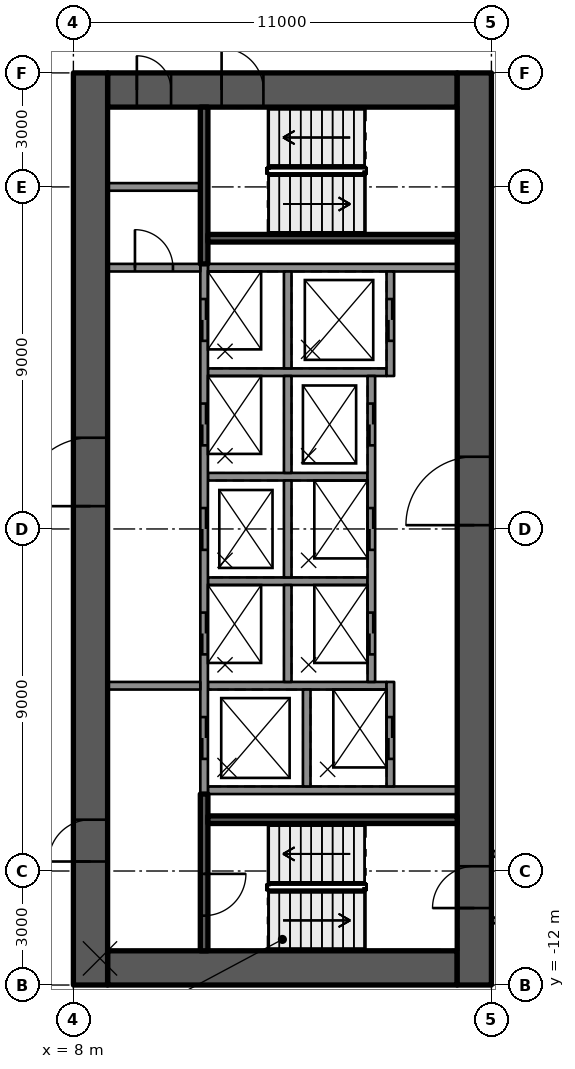
"""IFC4 building model, lengths in metres.
Left out: names, types, materials, properties, quantities, classifications, styles, units other than length and angle.
Written with IfcOpenShell. Run it as: python <this file> out.ifc"""

import sys

from ifc_helpers import new_model, si_unit, direction, frame, frame_2d, origin, place, context, subcontext, project, spatial, rectangle, extrude, element, fill, save


model = new_model("IFC4")
c1 = context("Model", 3, precision=1e-05, world=origin(), true_north=direction((0.0, 1.0)))
c2 = subcontext(c1, "Body", "Model", "MODEL_VIEW")
j1 = project(units=[si_unit("LENGTHUNIT", "METRE"), si_unit("PLANEANGLEUNIT", "RADIAN")], contexts=[c1])
p1 = place(None, origin())
s1 = spatial("IfcSite", under=j1, at=p1, CompositionType="ELEMENT")
p2 = place(p1, origin())
s2 = spatial("IfcBuilding", under=s1, at=p2, CompositionType="ELEMENT")
p3 = place(p2, origin())
s3 = spatial("IfcBuildingStorey", under=s2, at=p3, CompositionType="ELEMENT", Elevation=0.0)
p4 = place(p3, frame((8.9, 11.55, -0.5), z_axis=(0.0, 0.0, 1.0), x_axis=(1.0, 0.0, 0.0)))
e1 = element("IfcWall", 1, at=p4, inside=s3, PredefinedType="SHEAR", context=c2, shape_type="SweptSolid", body=[
    extrude(rectangle(XDim=9.2, YDim=0.9, at=frame_2d((4.6, 0.0))), origin(), (0.0, 0.0, 1.0), 11.0),
])
p5 = place(p4, frame((3.0, 0.0, 0.5)))
e2 = element("IfcOpeningElement", 2, at=p5, cuts=e1, PredefinedType="OPENING", context=c2, shape_type="SweptSolid", body=[
    extrude(rectangle(XDim=1.1, YDim=2.1, at=frame_2d((0.55, 1.05))), frame((0.0, 0.46, 0.0), z_axis=(0.0, -1.0, 0.0), x_axis=(1.0, 0.0, 0.0)), (0.0, 0.0, 1.0), 0.92),
])
p6 = place(p4, frame((0.77, 0.0, 0.5)))
e3 = element("IfcOpeningElement", 3, at=p6, cuts=e1, PredefinedType="OPENING", context=c2, shape_type="SweptSolid", body=[
    extrude(rectangle(XDim=0.9, YDim=2.1, at=frame_2d((0.45, 1.05))), frame((0.0, 0.46, 0.0), z_axis=(0.0, -1.0, 0.0), x_axis=(1.0, 0.0, 0.0)), (0.0, 0.0, 1.0), 0.92),
])
p7 = place(p3, frame((8.9, -11.55, -0.5), z_axis=(0.0, 0.0, 1.0), x_axis=(1.0, 0.0, 0.0)))
e4 = element("IfcWall", 4, at=p7, inside=s3, PredefinedType="SHEAR", context=c2, shape_type="SweptSolid", body=[
    extrude(rectangle(XDim=9.2, YDim=0.9, at=frame_2d((4.6, 0.0))), origin(), (0.0, 0.0, 1.0), 11.0),
])
p8 = place(p3, frame((8.45, -12.0, -0.5), z_axis=(0.0, 0.0, 1.0), x_axis=(0.0, 1.0, 0.0)))
e5 = element("IfcWall", 5, at=p8, inside=s3, PredefinedType="SHEAR", context=c2, shape_type="SweptSolid", body=[
    extrude(rectangle(XDim=24.0, YDim=0.9, at=frame_2d((12.0, 0.0))), origin(), (0.0, 0.0, 1.0), 11.0),
])
p9 = place(p8, frame((12.6, 0.0, 0.5)))
e6 = element("IfcOpeningElement", 6, at=p9, cuts=e5, PredefinedType="OPENING", context=c2, shape_type="SweptSolid", body=[
    extrude(rectangle(XDim=1.8, YDim=2.1, at=frame_2d((0.9, 1.05))), frame((0.0, 0.46, 0.0), z_axis=(0.0, -1.0, 0.0), x_axis=(1.0, 0.0, 0.0)), (0.0, 0.0, 1.0), 0.92),
])
p10 = place(p8, frame((3.25, 0.0, 0.5)))
e7 = element("IfcOpeningElement", 7, at=p10, cuts=e5, PredefinedType="OPENING", context=c2, shape_type="SweptSolid", body=[
    extrude(rectangle(XDim=1.1, YDim=2.1, at=frame_2d((0.55, 1.05))), frame((0.0, 0.46, 0.0), z_axis=(0.0, -1.0, 0.0), x_axis=(1.0, 0.0, 0.0)), (0.0, 0.0, 1.0), 0.92),
])
p11 = place(p3, frame((18.55, -12.0, -0.5), z_axis=(0.0, 0.0, 1.0), x_axis=(0.0, 1.0, 0.0)))
e8 = element("IfcWall", 8, at=p11, inside=s3, PredefinedType="SHEAR", context=c2, shape_type="SweptSolid", body=[
    extrude(rectangle(XDim=24.0, YDim=0.9, at=frame_2d((12.0, 0.0))), origin(), (0.0, 0.0, 1.0), 11.0),
])
p12 = place(p11, frame((12.1, 0.0, 0.5)))
e9 = element("IfcOpeningElement", 9, at=p12, cuts=e8, PredefinedType="OPENING", context=c2, shape_type="SweptSolid", body=[
    extrude(rectangle(XDim=1.8, YDim=2.1, at=frame_2d((0.9, 1.05))), frame((0.0, 0.46, 0.0), z_axis=(0.0, -1.0, 0.0), x_axis=(1.0, 0.0, 0.0)), (0.0, 0.0, 1.0), 0.92),
])
p13 = place(p11, frame((2.025, 0.0, 0.5)))
e10 = element("IfcOpeningElement", 10, at=p13, cuts=e8, PredefinedType="OPENING", context=c2, shape_type="SweptSolid", body=[
    extrude(rectangle(XDim=1.1, YDim=2.1, at=frame_2d((0.55, 1.05))), frame((0.0, 0.46, 0.0), z_axis=(0.0, -1.0, 0.0), x_axis=(1.0, 0.0, 0.0)), (0.0, 0.0, 1.0), 0.92),
])
for number, where, z_axis, x_axis in (
    (11, (11.54, -6.875, 0.0), (0.0, 0.0, 1.0), (1.0, 0.0, 0.0)),
    (12, (11.54, 6.875, 0.0), (0.0, 0.0, 1.0), (1.0, 0.0, 0.0)),
):
    element("IfcWall", number, at=place(p3, frame(where, z_axis=z_axis, x_axis=x_axis)), inside=s3, PredefinedType="SOLIDWALL", context=c2, shape_type="SweptSolid", body=[
        extrude(rectangle(XDim=6.56, YDim=0.2, at=frame_2d((3.28, 0.0))), origin(), (0.0, 0.0, 1.0), 10.09),
    ])
p14 = place(p3, frame((11.54, 4.125, 0.0), z_axis=(0.0, 0.0, 1.0), x_axis=(1.0, 0.0, 0.0)))
e13 = element("IfcWall", 13, at=p14, inside=s3, PredefinedType="SOLIDWALL", context=c2, shape_type="SweptSolid", body=[
    extrude(rectangle(XDim=4.7, YDim=0.2, at=frame_2d((2.35, 0.0))), origin(), (0.0, 0.0, 1.0), 10.09),
])
for number, where, z_axis, x_axis in (
    (14, (11.54, 1.375, 0.0), (0.0, 0.0, 1.0), (1.0, 0.0, 0.0)),
    (15, (11.54, -1.375, 0.0), (0.0, 0.0, 1.0), (1.0, 0.0, 0.0)),
):
    element("IfcWall", number, at=place(p3, frame(where, z_axis=z_axis, x_axis=x_axis)), inside=s3, PredefinedType="SOLIDWALL", context=c2, shape_type="SweptSolid", body=[
        extrude(rectangle(XDim=4.2, YDim=0.2, at=frame_2d((2.1, 0.0))), origin(), (0.0, 0.0, 1.0), 10.09),
    ])
p15 = place(p3, frame((11.54, -4.125, 0.0), z_axis=(0.0, 0.0, 1.0), x_axis=(1.0, 0.0, 0.0)))
e16 = element("IfcWall", 16, at=p15, inside=s3, PredefinedType="SOLIDWALL", context=c2, shape_type="SweptSolid", body=[
    extrude(rectangle(XDim=4.7, YDim=0.2, at=frame_2d((2.35, 0.0))), origin(), (0.0, 0.0, 1.0), 10.09),
])
p16 = place(p3, frame((11.44, 6.975, 0.0), z_axis=(0.0, 0.0, 1.0), x_axis=(0.0, -1.0, 0.0)))
e17 = element("IfcWall", 17, at=p16, inside=s3, PredefinedType="SOLIDWALL", context=c2, shape_type="SweptSolid", body=[
    extrude(rectangle(XDim=13.95, YDim=0.2, at=frame_2d((6.975, 0.0))), origin(), (0.0, 0.0, 1.0), 10.09),
])
p17 = place(p16, frame((0.925, 0.0, 0.0)))
e18 = element("IfcOpeningElement", 18, at=p17, cuts=e17, PredefinedType="OPENING", context=c2, shape_type="SweptSolid", body=[
    extrude(rectangle(XDim=1.1, YDim=2.1, at=frame_2d((0.55, 1.05))), frame((0.0, 0.11, 0.0), z_axis=(0.0, -1.0, 0.0), x_axis=(1.0, 0.0, 0.0)), (0.0, 0.0, 1.0), 0.22),
])
p18 = place(p16, frame((3.675, 0.0, 0.0)))
e19 = element("IfcOpeningElement", 19, at=p18, cuts=e17, PredefinedType="OPENING", context=c2, shape_type="SweptSolid", body=[
    extrude(rectangle(XDim=1.1, YDim=2.1, at=frame_2d((0.55, 1.05))), frame((0.0, 0.11, 0.0), z_axis=(0.0, -1.0, 0.0), x_axis=(1.0, 0.0, 0.0)), (0.0, 0.0, 1.0), 0.22),
])
p19 = place(p16, frame((6.425, 0.0, 0.0)))
e20 = element("IfcOpeningElement", 20, at=p19, cuts=e17, PredefinedType="OPENING", context=c2, shape_type="SweptSolid", body=[
    extrude(rectangle(XDim=1.1, YDim=2.1, at=frame_2d((0.55, 1.05))), frame((0.0, 0.11, 0.0), z_axis=(0.0, -1.0, 0.0), x_axis=(1.0, 0.0, 0.0)), (0.0, 0.0, 1.0), 0.22),
])
p20 = place(p16, frame((9.175, 0.0, 0.0)))
e21 = element("IfcOpeningElement", 21, at=p20, cuts=e17, PredefinedType="OPENING", context=c2, shape_type="SweptSolid", body=[
    extrude(rectangle(XDim=1.1, YDim=2.1, at=frame_2d((0.55, 1.05))), frame((0.0, 0.11, 0.0), z_axis=(0.0, -1.0, 0.0), x_axis=(1.0, 0.0, 0.0)), (0.0, 0.0, 1.0), 0.22),
])
p21 = place(p16, frame((11.925, 0.0, 0.0)))
e22 = element("IfcOpeningElement", 22, at=p21, cuts=e17, PredefinedType="OPENING", context=c2, shape_type="SweptSolid", body=[
    extrude(rectangle(XDim=1.1, YDim=2.1, at=frame_2d((0.55, 1.05))), frame((0.0, 0.11, 0.0), z_axis=(0.0, -1.0, 0.0), x_axis=(1.0, 0.0, 0.0)), (0.0, 0.0, 1.0), 0.22),
])
for number, where, z_axis, x_axis in (
    (23, (13.64, 6.775, 0.0), (0.0, 0.0, 1.0), (0.0, -1.0, 0.0)),
    (24, (13.64, 4.025, 0.0), (0.0, 0.0, 1.0), (0.0, -1.0, 0.0)),
    (25, (13.64, 1.275, 0.0), (0.0, 0.0, 1.0), (0.0, -1.0, 0.0)),
    (26, (13.64, -1.475, 0.0), (0.0, 0.0, 1.0), (0.0, -1.0, 0.0)),
    (27, (14.14, -4.225, 0.0), (0.0, 0.0, 1.0), (0.0, -1.0, 0.0)),
):
    element("IfcWall", number, at=place(p3, frame(where, z_axis=z_axis, x_axis=x_axis)), inside=s3, PredefinedType="SOLIDWALL", context=c2, shape_type="SweptSolid", body=[
        extrude(rectangle(XDim=2.55, YDim=0.2, at=frame_2d((1.275, 0.0))), origin(), (0.0, 0.0, 1.0), 10.09),
    ])
p22 = place(p3, frame((16.34, 6.775, 0.0), z_axis=(0.0, 0.0, 1.0), x_axis=(0.0, -1.0, 0.0)))
e28 = element("IfcWall", 28, at=p22, inside=s3, PredefinedType="SOLIDWALL", context=c2, shape_type="SweptSolid", body=[
    extrude(rectangle(XDim=2.75, YDim=0.2, at=frame_2d((1.375, 0.0))), origin(), (0.0, 0.0, 1.0), 10.09),
])
p23 = place(p22, frame((0.725, 0.0, 0.0)))
e29 = element("IfcOpeningElement", 29, at=p23, cuts=e28, PredefinedType="OPENING", context=c2, shape_type="SweptSolid", body=[
    extrude(rectangle(XDim=1.1, YDim=2.1, at=frame_2d((0.55, 1.05))), frame((0.0, 0.11, 0.0), z_axis=(0.0, -1.0, 0.0), x_axis=(1.0, 0.0, 0.0)), (0.0, 0.0, 1.0), 0.22),
])
p24 = place(p3, frame((15.84, 4.025, 0.0), z_axis=(0.0, 0.0, 1.0), x_axis=(0.0, -1.0, 0.0)))
e30 = element("IfcWall", 30, at=p24, inside=s3, PredefinedType="SOLIDWALL", context=c2, shape_type="SweptSolid", body=[
    extrude(rectangle(XDim=8.05, YDim=0.2, at=frame_2d((4.025, 0.0))), origin(), (0.0, 0.0, 1.0), 10.09),
])
p25 = place(p24, frame((0.725, 0.0, 0.0)))
e31 = element("IfcOpeningElement", 31, at=p25, cuts=e30, PredefinedType="OPENING", context=c2, shape_type="SweptSolid", body=[
    extrude(rectangle(XDim=1.1, YDim=2.1, at=frame_2d((0.55, 1.05))), frame((0.0, 0.11, 0.0), z_axis=(0.0, -1.0, 0.0), x_axis=(1.0, 0.0, 0.0)), (0.0, 0.0, 1.0), 0.22),
])
p26 = place(p24, frame((3.475, 0.0, 0.0)))
e32 = element("IfcOpeningElement", 32, at=p26, cuts=e30, PredefinedType="OPENING", context=c2, shape_type="SweptSolid", body=[
    extrude(rectangle(XDim=1.1, YDim=2.1, at=frame_2d((0.55, 1.05))), frame((0.0, 0.11, 0.0), z_axis=(0.0, -1.0, 0.0), x_axis=(1.0, 0.0, 0.0)), (0.0, 0.0, 1.0), 0.22),
])
p27 = place(p24, frame((6.225, 0.0, 0.0)))
e33 = element("IfcOpeningElement", 33, at=p27, cuts=e30, PredefinedType="OPENING", context=c2, shape_type="SweptSolid", body=[
    extrude(rectangle(XDim=1.1, YDim=2.1, at=frame_2d((0.55, 1.05))), frame((0.0, 0.11, 0.0), z_axis=(0.0, -1.0, 0.0), x_axis=(1.0, 0.0, 0.0)), (0.0, 0.0, 1.0), 0.22),
])
p28 = place(p3, frame((16.34, -4.025, 0.0), z_axis=(0.0, 0.0, 1.0), x_axis=(0.0, -1.0, 0.0)))
e34 = element("IfcWall", 34, at=p28, inside=s3, PredefinedType="SOLIDWALL", context=c2, shape_type="SweptSolid", body=[
    extrude(rectangle(XDim=2.75, YDim=0.2, at=frame_2d((1.375, 0.0))), origin(), (0.0, 0.0, 1.0), 10.09),
])
p29 = place(p28, frame((0.925, 0.0, 0.0)))
e35 = element("IfcOpeningElement", 35, at=p29, cuts=e34, PredefinedType="OPENING", context=c2, shape_type="SweptSolid", body=[
    extrude(rectangle(XDim=1.1, YDim=2.1, at=frame_2d((0.55, 1.05))), frame((0.0, 0.11, 0.0), z_axis=(0.0, -1.0, 0.0), x_axis=(1.0, 0.0, 0.0)), (0.0, 0.0, 1.0), 0.22),
])
p30 = place(p3, frame((11.44, -6.975, 0.0), z_axis=(0.0, 0.0, 1.0), x_axis=(0.0, -1.0, 0.0)))
e36 = element("IfcWall", 36, at=p30, inside=s3, PredefinedType="SOLIDWALL", context=c2, shape_type="SweptSolid", body=[
    extrude(rectangle(XDim=4.125, YDim=0.2, at=frame_2d((2.062, 0.0))), origin(), (0.0, 0.0, 1.0), 10.09),
])
p31 = place(p30, frame((2.1, 0.0, 0.0)))
e37 = element("IfcOpeningElement", 37, at=p31, cuts=e36, PredefinedType="OPENING", context=c2, shape_type="SweptSolid", body=[
    extrude(rectangle(XDim=1.1, YDim=2.1, at=frame_2d((0.55, 1.05))), frame((0.0, 0.11, 0.0), z_axis=(0.0, -1.0, 0.0), x_axis=(1.0, 0.0, 0.0)), (0.0, 0.0, 1.0), 0.22),
])
p32 = place(p3, frame((11.54, -7.65, 0.0), z_axis=(0.0, 0.0, 1.0), x_axis=(1.0, 0.0, 0.0)))
e38 = element("IfcWall", 38, at=p32, inside=s3, PredefinedType="SOLIDWALL", context=c2, shape_type="SweptSolid", body=[
    extrude(rectangle(XDim=6.56, YDim=0.2, at=frame_2d((3.28, 0.0))), origin(), (0.0, 0.0, 1.0), 10.09),
])
p33 = place(p3, frame((11.44, 11.1, 0.0), z_axis=(0.0, 0.0, 1.0), x_axis=(0.0, -1.0, 0.0)))
e39 = element("IfcWall", 39, at=p33, inside=s3, PredefinedType="SOLIDWALL", context=c2, shape_type="SweptSolid", body=[
    extrude(rectangle(XDim=4.125, YDim=0.2, at=frame_2d((2.062, 0.0))), origin(), (0.0, 0.0, 1.0), 10.09),
])
p34 = place(p3, frame((11.54, 7.65, 0.0), z_axis=(0.0, 0.0, 1.0), x_axis=(1.0, 0.0, 0.0)))
e40 = element("IfcWall", 40, at=p34, inside=s3, PredefinedType="SOLIDWALL", context=c2, shape_type="SweptSolid", body=[
    extrude(rectangle(XDim=6.56, YDim=0.2, at=frame_2d((3.28, 0.0))), origin(), (0.0, 0.0, 1.0), 10.09),
])
p35 = place(p3, frame((8.9, -4.125, 0.0), z_axis=(0.0, 0.0, 1.0), x_axis=(1.0, 0.0, 0.0)))
e41 = element("IfcWall", 41, at=p35, inside=s3, PredefinedType="PARTITIONING", context=c2, shape_type="SweptSolid", body=[
    extrude(rectangle(XDim=2.44, YDim=0.2, at=frame_2d((1.22, 0.0))), origin(), (0.0, 0.0, 1.0), 10.09),
])
p36 = place(p3, frame((8.9, 6.875, 0.0), z_axis=(0.0, 0.0, 1.0), x_axis=(1.0, 0.0, 0.0)))
e42 = element("IfcWall", 42, at=p36, inside=s3, PredefinedType="PARTITIONING", context=c2, shape_type="SweptSolid", body=[
    extrude(rectangle(XDim=2.44, YDim=0.2, at=frame_2d((1.22, 0.0))), origin(), (0.0, 0.0, 1.0), 10.09),
])
p37 = place(p36, frame((0.72, 0.0, 0.0)))
e43 = element("IfcOpeningElement", 43, at=p37, cuts=e42, PredefinedType="OPENING", context=c2, shape_type="SweptSolid", body=[
    extrude(rectangle(XDim=1.0, YDim=2.1, at=frame_2d((0.5, 1.05))), frame((0.0, 0.11, 0.0), z_axis=(0.0, -1.0, 0.0), x_axis=(1.0, 0.0, 0.0)), (0.0, 0.0, 1.0), 0.22),
])
p38 = place(p3, frame((8.9, 9.0, 0.0), z_axis=(0.0, 0.0, 1.0), x_axis=(1.0, 0.0, 0.0)))
e44 = element("IfcWall", 44, at=p38, inside=s3, PredefinedType="PARTITIONING", context=c2, shape_type="SweptSolid", body=[
    extrude(rectangle(XDim=2.44, YDim=0.2, at=frame_2d((1.22, 0.0))), origin(), (0.0, 0.0, 1.0), 10.09),
])
p39 = place(p3, frame((19.0, -8.55, 0.0), z_axis=(0.0, 0.0, 1.0), x_axis=(1.0, 0.0, 0.0)))
e45 = element("IfcWall", 45, at=p39, inside=s3, PredefinedType="SOLIDWALL", context=c2, shape_type="SweptSolid", body=[
    extrude(rectangle(XDim=2.3, YDim=0.15, at=frame_2d((1.15, 0.0))), origin(), (0.0, 0.0, 1.0), 10.09),
])
p40 = place(p3, frame((19.0, -10.3, 0.0), z_axis=(0.0, 0.0, 1.0), x_axis=(1.0, 0.0, 0.0)))
e46 = element("IfcWall", 46, at=p40, inside=s3, PredefinedType="SOLIDWALL", context=c2, shape_type="SweptSolid", body=[
    extrude(rectangle(XDim=4.05, YDim=0.15, at=frame_2d((2.025, 0.0))), origin(), (0.0, 0.0, 1.0), 10.09),
])
p41 = place(p17, origin())
e47 = element("IfcDoor", 47, at=p41, inside=s3, OperationType="DOUBLE_DOOR_SLIDING", PredefinedType="DOOR", context=c2, shape_type="SweptSolid", body=[
    extrude(rectangle(XDim=1.1, YDim=2.1, at=frame_2d((0.55, 1.05))), frame((0.0, 0.025, 0.0), z_axis=(0.0, -1.0, 0.0), x_axis=(1.0, 0.0, 0.0)), (0.0, 0.0, 1.0), 0.05),
])
fill(e18, e47)
p42 = place(p23, origin())
e48 = element("IfcDoor", 48, at=p42, inside=s3, OperationType="DOUBLE_DOOR_SLIDING", PredefinedType="DOOR", context=c2, shape_type="SweptSolid", body=[
    extrude(rectangle(XDim=1.1, YDim=2.1, at=frame_2d((0.55, 1.05))), frame((0.0, 0.025, 0.0), z_axis=(0.0, -1.0, 0.0), x_axis=(1.0, 0.0, 0.0)), (0.0, 0.0, 1.0), 0.05),
])
fill(e29, e48)
p43 = place(p18, origin())
e49 = element("IfcDoor", 49, at=p43, inside=s3, OperationType="DOUBLE_DOOR_SLIDING", PredefinedType="DOOR", context=c2, shape_type="SweptSolid", body=[
    extrude(rectangle(XDim=1.1, YDim=2.1, at=frame_2d((0.55, 1.05))), frame((0.0, 0.025, 0.0), z_axis=(0.0, -1.0, 0.0), x_axis=(1.0, 0.0, 0.0)), (0.0, 0.0, 1.0), 0.05),
])
fill(e19, e49)
p44 = place(p25, origin())
e50 = element("IfcDoor", 50, at=p44, inside=s3, OperationType="DOUBLE_DOOR_SLIDING", PredefinedType="DOOR", context=c2, shape_type="SweptSolid", body=[
    extrude(rectangle(XDim=1.1, YDim=2.1, at=frame_2d((0.55, 1.05))), frame((0.0, 0.025, 0.0), z_axis=(0.0, -1.0, 0.0), x_axis=(1.0, 0.0, 0.0)), (0.0, 0.0, 1.0), 0.05),
])
fill(e31, e50)
p45 = place(p19, origin())
e51 = element("IfcDoor", 51, at=p45, inside=s3, OperationType="DOUBLE_DOOR_SLIDING", PredefinedType="DOOR", context=c2, shape_type="SweptSolid", body=[
    extrude(rectangle(XDim=1.1, YDim=2.1, at=frame_2d((0.55, 1.05))), frame((0.0, 0.025, 0.0), z_axis=(0.0, -1.0, 0.0), x_axis=(1.0, 0.0, 0.0)), (0.0, 0.0, 1.0), 0.05),
])
fill(e20, e51)
p46 = place(p26, origin())
e52 = element("IfcDoor", 52, at=p46, inside=s3, OperationType="DOUBLE_DOOR_SLIDING", PredefinedType="DOOR", context=c2, shape_type="SweptSolid", body=[
    extrude(rectangle(XDim=1.1, YDim=2.1, at=frame_2d((0.55, 1.05))), frame((0.0, 0.025, 0.0), z_axis=(0.0, -1.0, 0.0), x_axis=(1.0, 0.0, 0.0)), (0.0, 0.0, 1.0), 0.05),
])
fill(e32, e52)
p47 = place(p20, origin())
e53 = element("IfcDoor", 53, at=p47, inside=s3, OperationType="DOUBLE_DOOR_SLIDING", PredefinedType="DOOR", context=c2, shape_type="SweptSolid", body=[
    extrude(rectangle(XDim=1.1, YDim=2.1, at=frame_2d((0.55, 1.05))), frame((0.0, 0.025, 0.0), z_axis=(0.0, -1.0, 0.0), x_axis=(1.0, 0.0, 0.0)), (0.0, 0.0, 1.0), 0.05),
])
fill(e21, e53)
p48 = place(p27, origin())
e54 = element("IfcDoor", 54, at=p48, inside=s3, OperationType="DOUBLE_DOOR_SLIDING", PredefinedType="DOOR", context=c2, shape_type="SweptSolid", body=[
    extrude(rectangle(XDim=1.1, YDim=2.1, at=frame_2d((0.55, 1.05))), frame((0.0, 0.025, 0.0), z_axis=(0.0, -1.0, 0.0), x_axis=(1.0, 0.0, 0.0)), (0.0, 0.0, 1.0), 0.05),
])
fill(e33, e54)
p49 = place(p21, origin())
e55 = element("IfcDoor", 55, at=p49, inside=s3, OperationType="DOUBLE_DOOR_SLIDING", PredefinedType="DOOR", context=c2, shape_type="SweptSolid", body=[
    extrude(rectangle(XDim=1.1, YDim=2.1, at=frame_2d((0.55, 1.05))), frame((0.0, 0.025, 0.0), z_axis=(0.0, -1.0, 0.0), x_axis=(1.0, 0.0, 0.0)), (0.0, 0.0, 1.0), 0.05),
])
fill(e22, e55)
p50 = place(p29, origin())
e56 = element("IfcDoor", 56, at=p50, inside=s3, OperationType="DOUBLE_DOOR_SLIDING", PredefinedType="DOOR", context=c2, shape_type="SweptSolid", body=[
    extrude(rectangle(XDim=1.1, YDim=2.1, at=frame_2d((0.55, 1.05))), frame((0.0, 0.025, 0.0), z_axis=(0.0, -1.0, 0.0), x_axis=(1.0, 0.0, 0.0)), (0.0, 0.0, 1.0), 0.05),
])
fill(e35, e56)
p51 = place(p9, origin())
e57 = element("IfcDoor", 57, at=p51, inside=s3, OperationType="SINGLE_SWING_RIGHT", PredefinedType="DOOR", context=c2, shape_type="SweptSolid", body=[
    extrude(rectangle(XDim=1.8, YDim=2.1, at=frame_2d((0.9, 1.05))), frame((0.0, 0.025, 0.0), z_axis=(0.0, -1.0, 0.0), x_axis=(1.0, 0.0, 0.0)), (0.0, 0.0, 1.0), 0.05),
])
fill(e6, e57)
p52 = place(p12, origin())
e58 = element("IfcDoor", 58, at=p52, inside=s3, OperationType="SINGLE_SWING_RIGHT", PredefinedType="DOOR", context=c2, shape_type="SweptSolid", body=[
    extrude(rectangle(XDim=1.8, YDim=2.1, at=frame_2d((0.9, 1.05))), frame((0.0, 0.025, 0.0), z_axis=(0.0, -1.0, 0.0), x_axis=(1.0, 0.0, 0.0)), (0.0, 0.0, 1.0), 0.05),
])
fill(e9, e58)
p53 = place(p10, origin())
e59 = element("IfcDoor", 59, at=p53, inside=s3, OperationType="SINGLE_SWING_LEFT", PredefinedType="DOOR", context=c2, shape_type="SweptSolid", body=[
    extrude(rectangle(XDim=1.1, YDim=2.1, at=frame_2d((0.55, 1.05))), frame((0.0, 0.025, 0.0), z_axis=(0.0, -1.0, 0.0), x_axis=(1.0, 0.0, 0.0)), (0.0, 0.0, 1.0), 0.05),
])
fill(e7, e59)
p54 = place(p5, origin())
e60 = element("IfcDoor", 60, at=p54, inside=s3, OperationType="SINGLE_SWING_LEFT", PredefinedType="DOOR", context=c2, shape_type="SweptSolid", body=[
    extrude(rectangle(XDim=1.1, YDim=2.1, at=frame_2d((0.55, 1.05))), frame((0.0, 0.025, 0.0), z_axis=(0.0, -1.0, 0.0), x_axis=(1.0, 0.0, 0.0)), (0.0, 0.0, 1.0), 0.05),
])
fill(e2, e60)
p55 = place(p31, origin())
e61 = element("IfcDoor", 61, at=p55, inside=s3, OperationType="SINGLE_SWING_RIGHT", PredefinedType="DOOR", context=c2, shape_type="SweptSolid", body=[
    extrude(rectangle(XDim=1.1, YDim=2.1, at=frame_2d((0.55, 1.05))), frame((0.0, 0.025, 0.0), z_axis=(0.0, -1.0, 0.0), x_axis=(1.0, 0.0, 0.0)), (0.0, 0.0, 1.0), 0.05),
])
fill(e37, e61)
p56 = place(p6, origin())
e62 = element("IfcDoor", 62, at=p56, inside=s3, OperationType="SINGLE_SWING_LEFT", PredefinedType="DOOR", context=c2, shape_type="SweptSolid", body=[
    extrude(rectangle(XDim=0.9, YDim=2.1, at=frame_2d((0.45, 1.05))), frame((0.0, 0.025, 0.0), z_axis=(0.0, -1.0, 0.0), x_axis=(1.0, 0.0, 0.0)), (0.0, 0.0, 1.0), 0.05),
])
fill(e3, e62)
p57 = place(p37, origin())
e63 = element("IfcDoor", 63, at=p57, inside=s3, OperationType="SINGLE_SWING_RIGHT", PredefinedType="DOOR", context=c2, shape_type="SweptSolid", body=[
    extrude(rectangle(XDim=1.0, YDim=2.1, at=frame_2d((0.5, 1.05))), frame((0.0, 0.025, 0.0), z_axis=(0.0, -1.0, 0.0), x_axis=(1.0, 0.0, 0.0)), (0.0, 0.0, 1.0), 0.05),
])
fill(e43, e63)
p58 = place(p13, origin())
e64 = element("IfcDoor", 64, at=p58, inside=s3, OperationType="SINGLE_SWING_LEFT", PredefinedType="DOOR", context=c2, shape_type="SweptSolid", body=[
    extrude(rectangle(XDim=1.1, YDim=2.1, at=frame_2d((0.55, 1.05))), frame((0.0, 0.025, 0.0), z_axis=(0.0, -1.0, 0.0), x_axis=(1.0, 0.0, 0.0)), (0.0, 0.0, 1.0), 0.05),
])
fill(e10, e64)
save(model, sys.argv[1])
